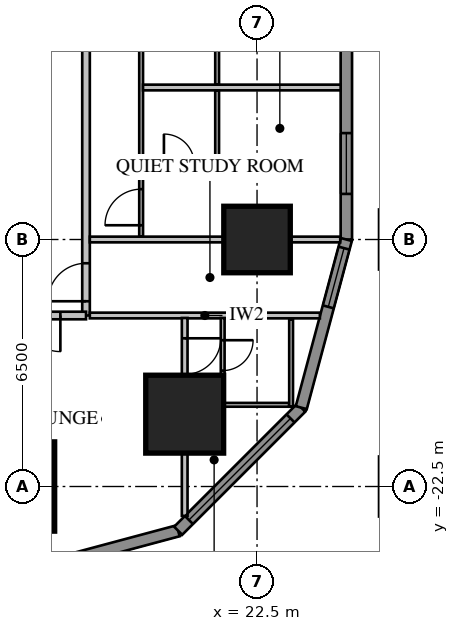
"""IFC4 building model, lengths in metres.
Left out: names, types, materials, properties, quantities, classifications, styles, units other than length and angle.
Written with IfcOpenShell. Run it as: python <this file> out.ifc"""

import sys

from ifc_helpers import new_model, si_unit, direction, frame, frame_2d, origin, origin_2d, place, context, subcontext, project, spatial, rectangle, extrude, element, fill, save


model = new_model("IFC4")
c1 = context("Model", 3, precision=1e-05, world=origin(), true_north=direction((0.0, 1.0)))
c2 = subcontext(c1, "Body", "Model", "MODEL_VIEW")
j1 = project(units=[si_unit("LENGTHUNIT", "METRE"), si_unit("PLANEANGLEUNIT", "RADIAN")], contexts=[c1])
p1 = place(None, origin())
s1 = spatial("IfcSite", under=j1, at=p1, CompositionType="ELEMENT")
p2 = place(p1, origin())
s2 = spatial("IfcBuilding", under=s1, at=p2, CompositionType="ELEMENT")
p3 = place(p2, frame((0.0, 0.0, 35.25)))
s3 = spatial("IfcBuildingStorey", under=s2, at=p3, CompositionType="ELEMENT", Elevation=35.25)
p4 = place(p3, frame((22.5, -16.0, 0.0), z_axis=(0.0, 0.0, 1.0), x_axis=(1.0, 0.0, 0.0)))
e1 = element("IfcColumn", 1, at=p4, inside=s3, PredefinedType="COLUMN", context=c2, shape_type="SweptSolid", body=[
    extrude(rectangle(XDim=1.75, YDim=1.75, at=origin_2d()), origin(), (0.0, 0.0, 1.0), 3.85),
])
p5 = place(p3, frame((16.0, -22.5, 0.0), z_axis=(0.0, 0.0, 1.0), x_axis=(1.0, 0.0, 0.0)))
e2 = element("IfcColumn", 2, at=p5, inside=s3, PredefinedType="COLUMN", context=c2, shape_type="SweptSolid", body=[
    extrude(rectangle(XDim=2.35, YDim=2.35, at=origin_2d()), origin(), (0.0, 0.0, 1.0), 3.85),
])
p6 = place(p3, frame((20.596, -20.596, 0.0), z_axis=(0.0, 0.0, 1.0), x_axis=(1.0, 0.0, 0.0)))
e3 = element("IfcColumn", 3, at=p6, inside=s3, PredefinedType="COLUMN", context=c2, shape_type="SweptSolid", body=[
    extrude(rectangle(XDim=2.05, YDim=2.05, at=origin_2d()), origin(), (0.0, 0.0, 1.0), 3.85),
])
p7 = place(p3, frame((24.85, -16.0, 0.0), z_axis=(0.0, 0.0, 1.0), x_axis=(0.0, 1.0, 0.0)))
e4 = element("IfcWall", 4, at=p7, inside=s3, PredefinedType="SOLIDWALL", context=c2, shape_type="SweptSolid", body=[
    extrude(rectangle(XDim=32.0, YDim=0.3, at=frame_2d((16.0, 0.0))), origin(), (0.0, 0.0, 1.0), 3.65),
])
p8 = place(p7, frame((1.2, 0.0, 0.75)))
e5 = element("IfcOpeningElement", 5, at=p8, cuts=e4, PredefinedType="OPENING", context=c2, shape_type="SweptSolid", body=[
    extrude(rectangle(XDim=1.6, YDim=1.8, at=frame_2d((0.8, 0.9))), frame((0.0, 0.17, 0.0), z_axis=(0.0, -1.0, 0.0), x_axis=(1.0, 0.0, 0.0)), (0.0, 0.0, 1.0), 0.34),
])
p9 = place(p7, frame((5.2, 0.0, 0.75)))
e6 = element("IfcOpeningElement", 6, at=p9, cuts=e4, PredefinedType="OPENING", context=c2, shape_type="SweptSolid", body=[
    extrude(rectangle(XDim=1.6, YDim=1.8, at=frame_2d((0.8, 0.9))), frame((0.0, 0.17, 0.0), z_axis=(0.0, -1.0, 0.0), x_axis=(1.0, 0.0, 0.0)), (0.0, 0.0, 1.0), 0.34),
])
p10 = place(p7, frame((17.2, 0.0, 0.75)))
e7 = element("IfcOpeningElement", 7, at=p10, cuts=e4, PredefinedType="OPENING", context=c2, shape_type="SweptSolid", body=[
    extrude(rectangle(XDim=1.6, YDim=1.8, at=frame_2d((0.8, 0.9))), frame((0.0, 0.17, 0.0), z_axis=(0.0, -1.0, 0.0), x_axis=(1.0, 0.0, 0.0)), (0.0, 0.0, 1.0), 0.34),
])
p11 = place(p7, frame((21.2, 0.0, 0.75)))
e8 = element("IfcOpeningElement", 8, at=p11, cuts=e4, PredefinedType="OPENING", context=c2, shape_type="SweptSolid", body=[
    extrude(rectangle(XDim=1.6, YDim=1.8, at=frame_2d((0.8, 0.9))), frame((0.0, 0.17, 0.0), z_axis=(0.0, -1.0, 0.0), x_axis=(1.0, 0.0, 0.0)), (0.0, 0.0, 1.0), 0.34),
])
p12 = place(p7, frame((25.2, 0.0, 0.75)))
e9 = element("IfcOpeningElement", 9, at=p12, cuts=e4, PredefinedType="OPENING", context=c2, shape_type="SweptSolid", body=[
    extrude(rectangle(XDim=1.6, YDim=1.8, at=frame_2d((0.8, 0.9))), frame((0.0, 0.17, 0.0), z_axis=(0.0, -1.0, 0.0), x_axis=(1.0, 0.0, 0.0)), (0.0, 0.0, 1.0), 0.34),
])
p13 = place(p7, frame((29.2, 0.0, 0.75)))
e10 = element("IfcOpeningElement", 10, at=p13, cuts=e4, PredefinedType="OPENING", context=c2, shape_type="SweptSolid", body=[
    extrude(rectangle(XDim=1.6, YDim=1.8, at=frame_2d((0.8, 0.9))), frame((0.0, 0.17, 0.0), z_axis=(0.0, -1.0, 0.0), x_axis=(1.0, 0.0, 0.0)), (0.0, 0.0, 1.0), 0.34),
])
p14 = place(p7, frame((8.8, 0.0, 0.75)))
e11 = element("IfcOpeningElement", 11, at=p14, cuts=e4, PredefinedType="OPENING", context=c2, shape_type="SweptSolid", body=[
    extrude(rectangle(XDim=2.4, YDim=1.8, at=frame_2d((1.2, 0.9))), frame((0.0, 0.17, 0.0), z_axis=(0.0, -1.0, 0.0), x_axis=(1.0, 0.0, 0.0)), (0.0, 0.0, 1.0), 0.34),
])
p15 = place(p7, frame((13.812, 0.0, 0.0)))
e12 = element("IfcOpeningElement", 12, at=p15, cuts=e4, PredefinedType="OPENING", context=c2, shape_type="SweptSolid", body=[
    extrude(rectangle(XDim=1.0, YDim=2.4, at=frame_2d((0.5, 1.2))), frame((0.0, 0.17, 0.0), z_axis=(0.0, -1.0, 0.0), x_axis=(1.0, 0.0, 0.0)), (0.0, 0.0, 1.0), 0.34),
])
p16 = place(p3, frame((16.0, -24.85, 0.0), z_axis=(0.0, 0.0, 1.0), x_axis=(0.965920218567, 0.258839972501, 0.0)))
e13 = element("IfcWall", 13, at=p16, inside=s3, PredefinedType="SOLIDWALL", context=c2, shape_type="SweptSolid", body=[
    extrude(rectangle(XDim=4.581, YDim=0.3, at=frame_2d((2.291, 0.0))), origin(), (0.0, 0.0, 1.0), 3.65),
])
p17 = place(p3, frame((20.425, -23.664, 0.0), z_axis=(0.0, 0.0, 1.0), x_axis=(0.707106781187, 0.707106781187, 0.0)))
e14 = element("IfcWall", 14, at=p17, inside=s3, PredefinedType="SOLIDWALL", context=c2, shape_type="SweptSolid", body=[
    extrude(rectangle(XDim=4.581, YDim=0.3, at=frame_2d((2.291, 0.0))), origin(), (0.0, 0.0, 1.0), 3.65),
])
p18 = place(p17, frame((0.4, 0.0, 0.75)))
e15 = element("IfcOpeningElement", 15, at=p18, cuts=e14, PredefinedType="OPENING", context=c2, shape_type="SweptSolid", body=[
    extrude(rectangle(XDim=3.781, YDim=1.8, at=frame_2d((1.891, 0.9))), frame((0.0, 0.17, 0.0), z_axis=(0.0, -1.0, 0.0), x_axis=(1.0, 0.0, 0.0)), (0.0, 0.0, 1.0), 0.34),
])
p19 = place(p3, frame((23.664, -20.425, 0.0), z_axis=(0.0, 0.0, 1.0), x_axis=(0.258839972501, 0.965920218567, 0.0)))
e16 = element("IfcWall", 16, at=p19, inside=s3, PredefinedType="SOLIDWALL", context=c2, shape_type="SweptSolid", body=[
    extrude(rectangle(XDim=4.581, YDim=0.3, at=frame_2d((2.291, 0.0))), origin(), (0.0, 0.0, 1.0), 3.65),
])
p20 = place(p19, frame((2.746, 0.0, 0.75)))
e17 = element("IfcOpeningElement", 17, at=p20, cuts=e16, PredefinedType="OPENING", context=c2, shape_type="SweptSolid", body=[
    extrude(rectangle(XDim=1.6, YDim=1.8, at=frame_2d((0.8, 0.9))), frame((0.0, 0.17, 0.0), z_axis=(0.0, -1.0, 0.0), x_axis=(1.0, 0.0, 0.0)), (0.0, 0.0, 1.0), 0.34),
])
p21 = place(p3, frame((18.0, -18.0, 0.0), z_axis=(0.0, 0.0, 1.0), x_axis=(0.0, 1.0, 0.0)))
e18 = element("IfcWall", 18, at=p21, inside=s3, PredefinedType="PARTITIONING", context=c2, shape_type="SweptSolid", body=[
    extrude(rectangle(XDim=36.0, YDim=0.2, at=frame_2d((18.0, 0.0))), origin(), (0.0, 0.0, 1.0), 3.65),
])
p22 = place(p21, frame((10.4, 0.0, 0.0)))
e19 = element("IfcOpeningElement", 19, at=p22, cuts=e18, PredefinedType="OPENING", context=c2, shape_type="SweptSolid", body=[
    extrude(rectangle(XDim=1.0, YDim=2.1, at=frame_2d((0.5, 1.05))), frame((0.0, 0.12, 0.0), z_axis=(0.0, -1.0, 0.0), x_axis=(1.0, 0.0, 0.0)), (0.0, 0.0, 1.0), 0.24),
])
p23 = place(p21, frame((0.375, 0.0, 0.0)))
e20 = element("IfcOpeningElement", 20, at=p23, cuts=e18, PredefinedType="OPENING", context=c2, shape_type="SweptSolid", body=[
    extrude(rectangle(XDim=1.0, YDim=2.1, at=frame_2d((0.5, 1.05))), frame((0.0, 0.12, 0.0), z_axis=(0.0, -1.0, 0.0), x_axis=(1.0, 0.0, 0.0)), (0.0, 0.0, 1.0), 0.24),
])
p24 = place(p21, frame((34.375, 0.0, 0.0)))
e21 = element("IfcOpeningElement", 21, at=p24, cuts=e18, PredefinedType="OPENING", context=c2, shape_type="SweptSolid", body=[
    extrude(rectangle(XDim=0.95, YDim=2.1, at=frame_2d((0.475, 1.05))), frame((0.0, 0.12, 0.0), z_axis=(0.0, -1.0, 0.0), x_axis=(1.0, 0.0, 0.0)), (0.0, 0.0, 1.0), 0.24),
])
p25 = place(p3, frame((19.45, -15.925, 0.0), z_axis=(0.0, 0.0, 1.0), x_axis=(0.0, 1.0, 0.0)))
e22 = element("IfcWall", 22, at=p25, inside=s3, PredefinedType="PARTITIONING", context=c2, shape_type="SweptSolid", body=[
    extrude(rectangle(XDim=31.85, YDim=0.1, at=frame_2d((15.925, 0.0))), origin(), (0.0, 0.0, 1.0), 3.65),
])
p26 = place(p25, frame((10.125, 0.0, 0.0)))
e23 = element("IfcOpeningElement", 23, at=p26, cuts=e22, PredefinedType="OPENING", context=c2, shape_type="SweptSolid", body=[
    extrude(rectangle(XDim=1.0, YDim=2.1, at=frame_2d((0.5, 1.05))), frame((0.0, 0.07, 0.0), z_axis=(0.0, -1.0, 0.0), x_axis=(1.0, 0.0, 0.0)), (0.0, 0.0, 1.0), 0.14),
])
p27 = place(p25, frame((8.3, 0.0, 0.0)))
e24 = element("IfcOpeningElement", 24, at=p27, cuts=e22, PredefinedType="OPENING", context=c2, shape_type="SweptSolid", body=[
    extrude(rectangle(XDim=0.8, YDim=2.1, at=frame_2d((0.4, 1.05))), frame((0.0, 0.07, 0.0), z_axis=(0.0, -1.0, 0.0), x_axis=(1.0, 0.0, 0.0)), (0.0, 0.0, 1.0), 0.14),
])
p28 = place(p25, frame((0.3, 0.0, 0.0)))
e25 = element("IfcOpeningElement", 25, at=p28, cuts=e22, PredefinedType="OPENING", context=c2, shape_type="SweptSolid", body=[
    extrude(rectangle(XDim=0.95, YDim=2.1, at=frame_2d((0.475, 1.05))), frame((0.0, 0.07, 0.0), z_axis=(0.0, -1.0, 0.0), x_axis=(1.0, 0.0, 0.0)), (0.0, 0.0, 1.0), 0.14),
])
p29 = place(p25, frame((6.175, 0.0, 0.0)))
e26 = element("IfcOpeningElement", 26, at=p29, cuts=e22, PredefinedType="OPENING", context=c2, shape_type="SweptSolid", body=[
    extrude(rectangle(XDim=0.95, YDim=2.1, at=frame_2d((0.475, 1.05))), frame((0.0, 0.07, 0.0), z_axis=(0.0, -1.0, 0.0), x_axis=(1.0, 0.0, 0.0)), (0.0, 0.0, 1.0), 0.14),
])
p30 = place(p25, frame((16.3, 0.0, 0.0)))
e27 = element("IfcOpeningElement", 27, at=p30, cuts=e22, PredefinedType="OPENING", context=c2, shape_type="SweptSolid", body=[
    extrude(rectangle(XDim=0.95, YDim=2.1, at=frame_2d((0.475, 1.05))), frame((0.0, 0.07, 0.0), z_axis=(0.0, -1.0, 0.0), x_axis=(1.0, 0.0, 0.0)), (0.0, 0.0, 1.0), 0.14),
])
p31 = place(p25, frame((22.175, 0.0, 0.0)))
e28 = element("IfcOpeningElement", 28, at=p31, cuts=e22, PredefinedType="OPENING", context=c2, shape_type="SweptSolid", body=[
    extrude(rectangle(XDim=0.95, YDim=2.1, at=frame_2d((0.475, 1.05))), frame((0.0, 0.07, 0.0), z_axis=(0.0, -1.0, 0.0), x_axis=(1.0, 0.0, 0.0)), (0.0, 0.0, 1.0), 0.14),
])
p32 = place(p25, frame((24.3, 0.0, 0.0)))
e29 = element("IfcOpeningElement", 29, at=p32, cuts=e22, PredefinedType="OPENING", context=c2, shape_type="SweptSolid", body=[
    extrude(rectangle(XDim=0.95, YDim=2.1, at=frame_2d((0.475, 1.05))), frame((0.0, 0.07, 0.0), z_axis=(0.0, -1.0, 0.0), x_axis=(1.0, 0.0, 0.0)), (0.0, 0.0, 1.0), 0.14),
])
p33 = place(p25, frame((30.175, 0.0, 0.0)))
e30 = element("IfcOpeningElement", 30, at=p33, cuts=e22, PredefinedType="OPENING", context=c2, shape_type="SweptSolid", body=[
    extrude(rectangle(XDim=0.95, YDim=2.1, at=frame_2d((0.475, 1.05))), frame((0.0, 0.07, 0.0), z_axis=(0.0, -1.0, 0.0), x_axis=(1.0, 0.0, 0.0)), (0.0, 0.0, 1.0), 0.14),
])
p34 = place(p3, frame((18.1, -18.0, 0.0), z_axis=(0.0, 0.0, 1.0), x_axis=(1.0, 0.0, 0.0)))
e31 = element("IfcWall", 31, at=p34, inside=s3, PredefinedType="PARTITIONING", context=c2, shape_type="SweptSolid", body=[
    extrude(rectangle(XDim=6.053, YDim=0.15, at=frame_2d((3.027, 0.0))), origin(), (0.0, 0.0, 1.0), 3.65),
])
p35 = place(p3, frame((18.1, -16.0, 0.0), z_axis=(0.0, 0.0, 1.0), x_axis=(1.0, 0.0, 0.0)))
e32 = element("IfcWall", 32, at=p35, inside=s3, PredefinedType="PARTITIONING", context=c2, shape_type="SweptSolid", body=[
    extrude(rectangle(XDim=6.589, YDim=0.15, at=frame_2d((3.295, 0.0))), origin(), (0.0, 0.0, 1.0), 3.65),
])
p36 = place(p3, frame((19.5, -12.0, 0.0), z_axis=(0.0, 0.0, 1.0), x_axis=(1.0, 0.0, 0.0)))
e33 = element("IfcWall", 33, at=p36, inside=s3, PredefinedType="PARTITIONING", context=c2, shape_type="SweptSolid", body=[
    extrude(rectangle(XDim=5.2, YDim=0.15, at=frame_2d((2.6, 0.0))), origin(), (0.0, 0.0, 1.0), 3.65),
])
p37 = place(p3, frame((19.5, -14.025, 0.0), z_axis=(0.0, 0.0, 1.0), x_axis=(1.0, 0.0, 0.0)))
e34 = element("IfcWall", 34, at=p37, inside=s3, PredefinedType="PARTITIONING", context=c2, shape_type="SweptSolid", body=[
    extrude(rectangle(XDim=2.0, YDim=0.1, at=frame_2d((1.0, 0.0))), origin(), (0.0, 0.0, 1.0), 3.65),
])
p38 = place(p37, frame((0.55, 0.0, 0.0)))
e35 = element("IfcOpeningElement", 35, at=p38, cuts=e34, PredefinedType="OPENING", context=c2, shape_type="SweptSolid", body=[
    extrude(rectangle(XDim=0.8, YDim=2.1, at=frame_2d((0.4, 1.05))), frame((0.0, 0.07, 0.0), z_axis=(0.0, -1.0, 0.0), x_axis=(1.0, 0.0, 0.0)), (0.0, 0.0, 1.0), 0.14),
])
for number, where, z_axis, x_axis in (
    (36, (21.45, -13.975, 0.0), (0.0, 0.0, 1.0), (0.0, 1.0, 0.0)),
    (37, (21.45, -11.925, 0.0), (0.0, 0.0, 1.0), (0.0, 1.0, 0.0)),
):
    element("IfcWall", number, at=place(p3, frame(where, z_axis=z_axis, x_axis=x_axis)), inside=s3, PredefinedType="PARTITIONING", context=c2, shape_type="SweptSolid", body=[
        extrude(rectangle(XDim=1.9, YDim=0.1, at=frame_2d((0.95, 0.0))), origin(), (0.0, 0.0, 1.0), 3.65),
    ])
p39 = place(p3, frame((-18.0, -18.0, 0.0), z_axis=(0.0, 0.0, 1.0), x_axis=(1.0, 0.0, 0.0)))
e38 = element("IfcWall", 38, at=p39, inside=s3, PredefinedType="PARTITIONING", context=c2, shape_type="SweptSolid", body=[
    extrude(rectangle(XDim=36.0, YDim=0.2, at=frame_2d((18.0, 0.0))), origin(), (0.0, 0.0, 1.0), 3.65),
])
p40 = place(p39, frame((0.375, 0.0, 0.0)))
e39 = element("IfcOpeningElement", 39, at=p40, cuts=e38, PredefinedType="OPENING", context=c2, shape_type="SweptSolid", body=[
    extrude(rectangle(XDim=1.0, YDim=2.1, at=frame_2d((0.5, 1.05))), frame((0.0, 0.12, 0.0), z_axis=(0.0, -1.0, 0.0), x_axis=(1.0, 0.0, 0.0)), (0.0, 0.0, 1.0), 0.24),
])
p41 = place(p39, frame((2.45, 0.0, 0.0)))
e40 = element("IfcOpeningElement", 40, at=p41, cuts=e38, PredefinedType="OPENING", context=c2, shape_type="SweptSolid", body=[
    extrude(rectangle(XDim=0.8, YDim=2.1, at=frame_2d((0.4, 1.05))), frame((0.0, 0.12, 0.0), z_axis=(0.0, -1.0, 0.0), x_axis=(1.0, 0.0, 0.0)), (0.0, 0.0, 1.0), 0.24),
])
p42 = place(p39, frame((4.05, 0.0, 0.0)))
e41 = element("IfcOpeningElement", 41, at=p42, cuts=e38, PredefinedType="OPENING", context=c2, shape_type="SweptSolid", body=[
    extrude(rectangle(XDim=1.0, YDim=2.1, at=frame_2d((0.5, 1.05))), frame((0.0, 0.12, 0.0), z_axis=(0.0, -1.0, 0.0), x_axis=(1.0, 0.0, 0.0)), (0.0, 0.0, 1.0), 0.24),
])
p43 = place(p39, frame((6.45, 0.0, 0.0)))
e42 = element("IfcOpeningElement", 42, at=p43, cuts=e38, PredefinedType="OPENING", context=c2, shape_type="SweptSolid", body=[
    extrude(rectangle(XDim=0.9, YDim=2.1, at=frame_2d((0.45, 1.05))), frame((0.0, 0.12, 0.0), z_axis=(0.0, -1.0, 0.0), x_axis=(1.0, 0.0, 0.0)), (0.0, 0.0, 1.0), 0.24),
])
p44 = place(p39, frame((8.15, 0.0, 0.0)))
e43 = element("IfcOpeningElement", 43, at=p44, cuts=e38, PredefinedType="OPENING", context=c2, shape_type="SweptSolid", body=[
    extrude(rectangle(XDim=1.0, YDim=2.1, at=frame_2d((0.5, 1.05))), frame((0.0, 0.12, 0.0), z_axis=(0.0, -1.0, 0.0), x_axis=(1.0, 0.0, 0.0)), (0.0, 0.0, 1.0), 0.24),
])
p45 = place(p39, frame((18.375, 0.0, 0.0)))
e44 = element("IfcOpeningElement", 44, at=p45, cuts=e38, PredefinedType="OPENING", context=c2, shape_type="SweptSolid", body=[
    extrude(rectangle(XDim=0.95, YDim=2.1, at=frame_2d((0.475, 1.05))), frame((0.0, 0.12, 0.0), z_axis=(0.0, -1.0, 0.0), x_axis=(1.0, 0.0, 0.0)), (0.0, 0.0, 1.0), 0.24),
])
p46 = place(p39, frame((24.25, 0.0, 0.0)))
e45 = element("IfcOpeningElement", 45, at=p46, cuts=e38, PredefinedType="OPENING", context=c2, shape_type="SweptSolid", body=[
    extrude(rectangle(XDim=0.95, YDim=2.1, at=frame_2d((0.475, 1.05))), frame((0.0, 0.12, 0.0), z_axis=(0.0, -1.0, 0.0), x_axis=(1.0, 0.0, 0.0)), (0.0, 0.0, 1.0), 0.24),
])
p47 = place(p39, frame((26.375, 0.0, 0.0)))
e46 = element("IfcOpeningElement", 46, at=p47, cuts=e38, PredefinedType="OPENING", context=c2, shape_type="SweptSolid", body=[
    extrude(rectangle(XDim=0.95, YDim=2.1, at=frame_2d((0.475, 1.05))), frame((0.0, 0.12, 0.0), z_axis=(0.0, -1.0, 0.0), x_axis=(1.0, 0.0, 0.0)), (0.0, 0.0, 1.0), 0.24),
])
p48 = place(p39, frame((32.25, 0.0, 0.0)))
e47 = element("IfcOpeningElement", 47, at=p48, cuts=e38, PredefinedType="OPENING", context=c2, shape_type="SweptSolid", body=[
    extrude(rectangle(XDim=0.95, YDim=2.1, at=frame_2d((0.475, 1.05))), frame((0.0, 0.12, 0.0), z_axis=(0.0, -1.0, 0.0), x_axis=(1.0, 0.0, 0.0)), (0.0, 0.0, 1.0), 0.24),
])
p49 = place(p39, frame((34.375, 0.0, 0.0)))
e48 = element("IfcOpeningElement", 48, at=p49, cuts=e38, PredefinedType="OPENING", context=c2, shape_type="SweptSolid", body=[
    extrude(rectangle(XDim=0.95, YDim=2.1, at=frame_2d((0.475, 1.05))), frame((0.0, 0.12, 0.0), z_axis=(0.0, -1.0, 0.0), x_axis=(1.0, 0.0, 0.0)), (0.0, 0.0, 1.0), 0.24),
])
p50 = place(p39, frame((11.2, 0.0, 0.0)))
e49 = element("IfcOpeningElement", 49, at=p50, cuts=e38, PredefinedType="OPENING", context=c2, shape_type="SweptSolid", body=[
    extrude(rectangle(XDim=1.0, YDim=2.1, at=frame_2d((0.5, 1.05))), frame((0.0, 0.12, 0.0), z_axis=(0.0, -1.0, 0.0), x_axis=(1.0, 0.0, 0.0)), (0.0, 0.0, 1.0), 0.24),
])
p51 = place(p3, frame((21.596, -18.065, 0.0), z_axis=(0.0, 0.0, 1.0), x_axis=(0.0, -1.0, 0.0)))
e50 = element("IfcWall", 50, at=p51, inside=s3, PredefinedType="PARTITIONING", context=c2, shape_type="SweptSolid", body=[
    extrude(rectangle(XDim=2.335, YDim=0.1, at=frame_2d((1.167, 0.0))), origin(), (0.0, 0.0, 1.0), 3.65),
])
p52 = place(p51, frame((0.585, 0.0, 0.0)))
e51 = element("IfcOpeningElement", 51, at=p52, cuts=e50, PredefinedType="OPENING", context=c2, shape_type="SweptSolid", body=[
    extrude(rectangle(XDim=0.8, YDim=2.1, at=frame_2d((0.4, 1.05))), frame((0.0, 0.07, 0.0), z_axis=(0.0, -1.0, 0.0), x_axis=(1.0, 0.0, 0.0)), (0.0, 0.0, 1.0), 0.14),
])
p53 = place(p3, frame((21.646, -20.35, 0.0), z_axis=(0.0, 0.0, 1.0), x_axis=(1.0, 0.0, 0.0)))
e52 = element("IfcWall", 52, at=p53, inside=s3, PredefinedType="PARTITIONING", context=c2, shape_type="SweptSolid", body=[
    extrude(rectangle(XDim=1.7, YDim=0.1, at=frame_2d((0.85, 0.0))), origin(), (0.0, 0.0, 1.0), 3.65),
])
p54 = place(p3, frame((23.396, -18.1, 0.0), z_axis=(0.0, 0.0, 1.0), x_axis=(0.0, -1.0, 0.0)))
e53 = element("IfcWall", 53, at=p54, inside=s3, PredefinedType="PARTITIONING", context=c2, shape_type="SweptSolid", body=[
    extrude(rectangle(XDim=2.3, YDim=0.1, at=frame_2d((1.15, 0.0))), origin(), (0.0, 0.0, 1.0), 3.65),
])
p55 = place(p3, frame((20.596, -18.065, 0.0), z_axis=(0.0, 0.0, 1.0), x_axis=(0.0, -1.0, 0.0)))
e54 = element("IfcWall", 54, at=p55, inside=s3, PredefinedType="PARTITIONING", context=c2, shape_type="SweptSolid", body=[
    extrude(rectangle(XDim=5.209, YDim=0.15, at=frame_2d((2.604, 0.0))), origin(), (0.0, 0.0, 1.0), 3.65),
])
p56 = place(p55, frame((0.535, 0.0, 0.0)))
e55 = element("IfcOpeningElement", 55, at=p56, cuts=e54, PredefinedType="OPENING", context=c2, shape_type="SweptSolid", body=[
    extrude(rectangle(XDim=0.95, YDim=2.1, at=frame_2d((0.475, 1.05))), frame((0.0, 0.095, 0.0), z_axis=(0.0, -1.0, 0.0), x_axis=(1.0, 0.0, 0.0)), (0.0, 0.0, 1.0), 0.19),
])
p57 = place(p20, origin())
e56 = element("IfcWindow", 56, at=p57, inside=s3, PartitioningType="SINGLE_PANEL", PredefinedType="WINDOW", context=c2, shape_type="SweptSolid", body=[
    extrude(rectangle(XDim=1.6, YDim=1.8, at=frame_2d((0.8, 0.9))), frame((0.0, 0.03, 0.0), z_axis=(0.0, -1.0, 0.0), x_axis=(1.0, 0.0, 0.0)), (0.0, 0.0, 1.0), 0.06),
])
fill(e17, e56)
p58 = place(p8, origin())
e57 = element("IfcWindow", 57, at=p58, inside=s3, PartitioningType="SINGLE_PANEL", PredefinedType="WINDOW", context=c2, shape_type="SweptSolid", body=[
    extrude(rectangle(XDim=1.6, YDim=1.8, at=frame_2d((0.8, 0.9))), frame((0.0, 0.03, 0.0), z_axis=(0.0, -1.0, 0.0), x_axis=(1.0, 0.0, 0.0)), (0.0, 0.0, 1.0), 0.06),
])
fill(e5, e57)
p59 = place(p18, origin())
e58 = element("IfcWindow", 58, at=p59, inside=s3, PartitioningType="SINGLE_PANEL", PredefinedType="WINDOW", context=c2, shape_type="SweptSolid", body=[
    extrude(rectangle(XDim=3.781, YDim=1.8, at=frame_2d((1.891, 0.9))), frame((0.0, 0.03, 0.0), z_axis=(0.0, -1.0, 0.0), x_axis=(1.0, 0.0, 0.0)), (0.0, 0.0, 1.0), 0.06),
])
fill(e15, e58)
p60 = place(p23, origin())
e59 = element("IfcDoor", 59, at=p60, inside=s3, OperationType="SINGLE_SWING_LEFT", PredefinedType="DOOR", context=c2, shape_type="SweptSolid", body=[
    extrude(rectangle(XDim=1.0, YDim=2.1, at=frame_2d((0.5, 1.05))), frame((0.0, 0.025, 0.0), z_axis=(0.0, -1.0, 0.0), x_axis=(1.0, 0.0, 0.0)), (0.0, 0.0, 1.0), 0.05),
])
fill(e20, e59)
p61 = place(p28, origin())
e60 = element("IfcDoor", 60, at=p61, inside=s3, OperationType="SINGLE_SWING_LEFT", PredefinedType="DOOR", context=c2, shape_type="SweptSolid", body=[
    extrude(rectangle(XDim=0.95, YDim=2.1, at=frame_2d((0.475, 1.05))), frame((0.0, 0.025, 0.0), z_axis=(0.0, -1.0, 0.0), x_axis=(1.0, 0.0, 0.0)), (0.0, 0.0, 1.0), 0.05),
])
fill(e25, e60)
p62 = place(p38, origin())
e61 = element("IfcDoor", 61, at=p62, inside=s3, OperationType="SINGLE_SWING_LEFT", PredefinedType="DOOR", context=c2, shape_type="SweptSolid", body=[
    extrude(rectangle(XDim=0.8, YDim=2.1, at=frame_2d((0.4, 1.05))), frame((0.0, 0.025, 0.0), z_axis=(0.0, -1.0, 0.0), x_axis=(1.0, 0.0, 0.0)), (0.0, 0.0, 1.0), 0.05),
])
fill(e35, e61)
p63 = place(p49, origin())
e62 = element("IfcDoor", 62, at=p63, inside=s3, OperationType="SINGLE_SWING_RIGHT", PredefinedType="DOOR", context=c2, shape_type="SweptSolid", body=[
    extrude(rectangle(XDim=0.95, YDim=2.1, at=frame_2d((0.475, 1.05))), frame((0.0, 0.025, 0.0), z_axis=(0.0, -1.0, 0.0), x_axis=(1.0, 0.0, 0.0)), (0.0, 0.0, 1.0), 0.05),
])
fill(e48, e62)
p64 = place(p52, origin())
e63 = element("IfcDoor", 63, at=p64, inside=s3, OperationType="SINGLE_SWING_LEFT", PredefinedType="DOOR", context=c2, shape_type="SweptSolid", body=[
    extrude(rectangle(XDim=0.8, YDim=2.1, at=frame_2d((0.4, 1.05))), frame((0.0, 0.025, 0.0), z_axis=(0.0, -1.0, 0.0), x_axis=(1.0, 0.0, 0.0)), (0.0, 0.0, 1.0), 0.05),
])
fill(e51, e63)
p65 = place(p56, origin())
e64 = element("IfcDoor", 64, at=p65, inside=s3, OperationType="SINGLE_SWING_LEFT", PredefinedType="DOOR", context=c2, shape_type="SweptSolid", body=[
    extrude(rectangle(XDim=0.95, YDim=2.1, at=frame_2d((0.475, 1.05))), frame((0.0, 0.025, 0.0), z_axis=(0.0, -1.0, 0.0), x_axis=(1.0, 0.0, 0.0)), (0.0, 0.0, 1.0), 0.05),
])
fill(e55, e64)
save(model, sys.argv[1])
